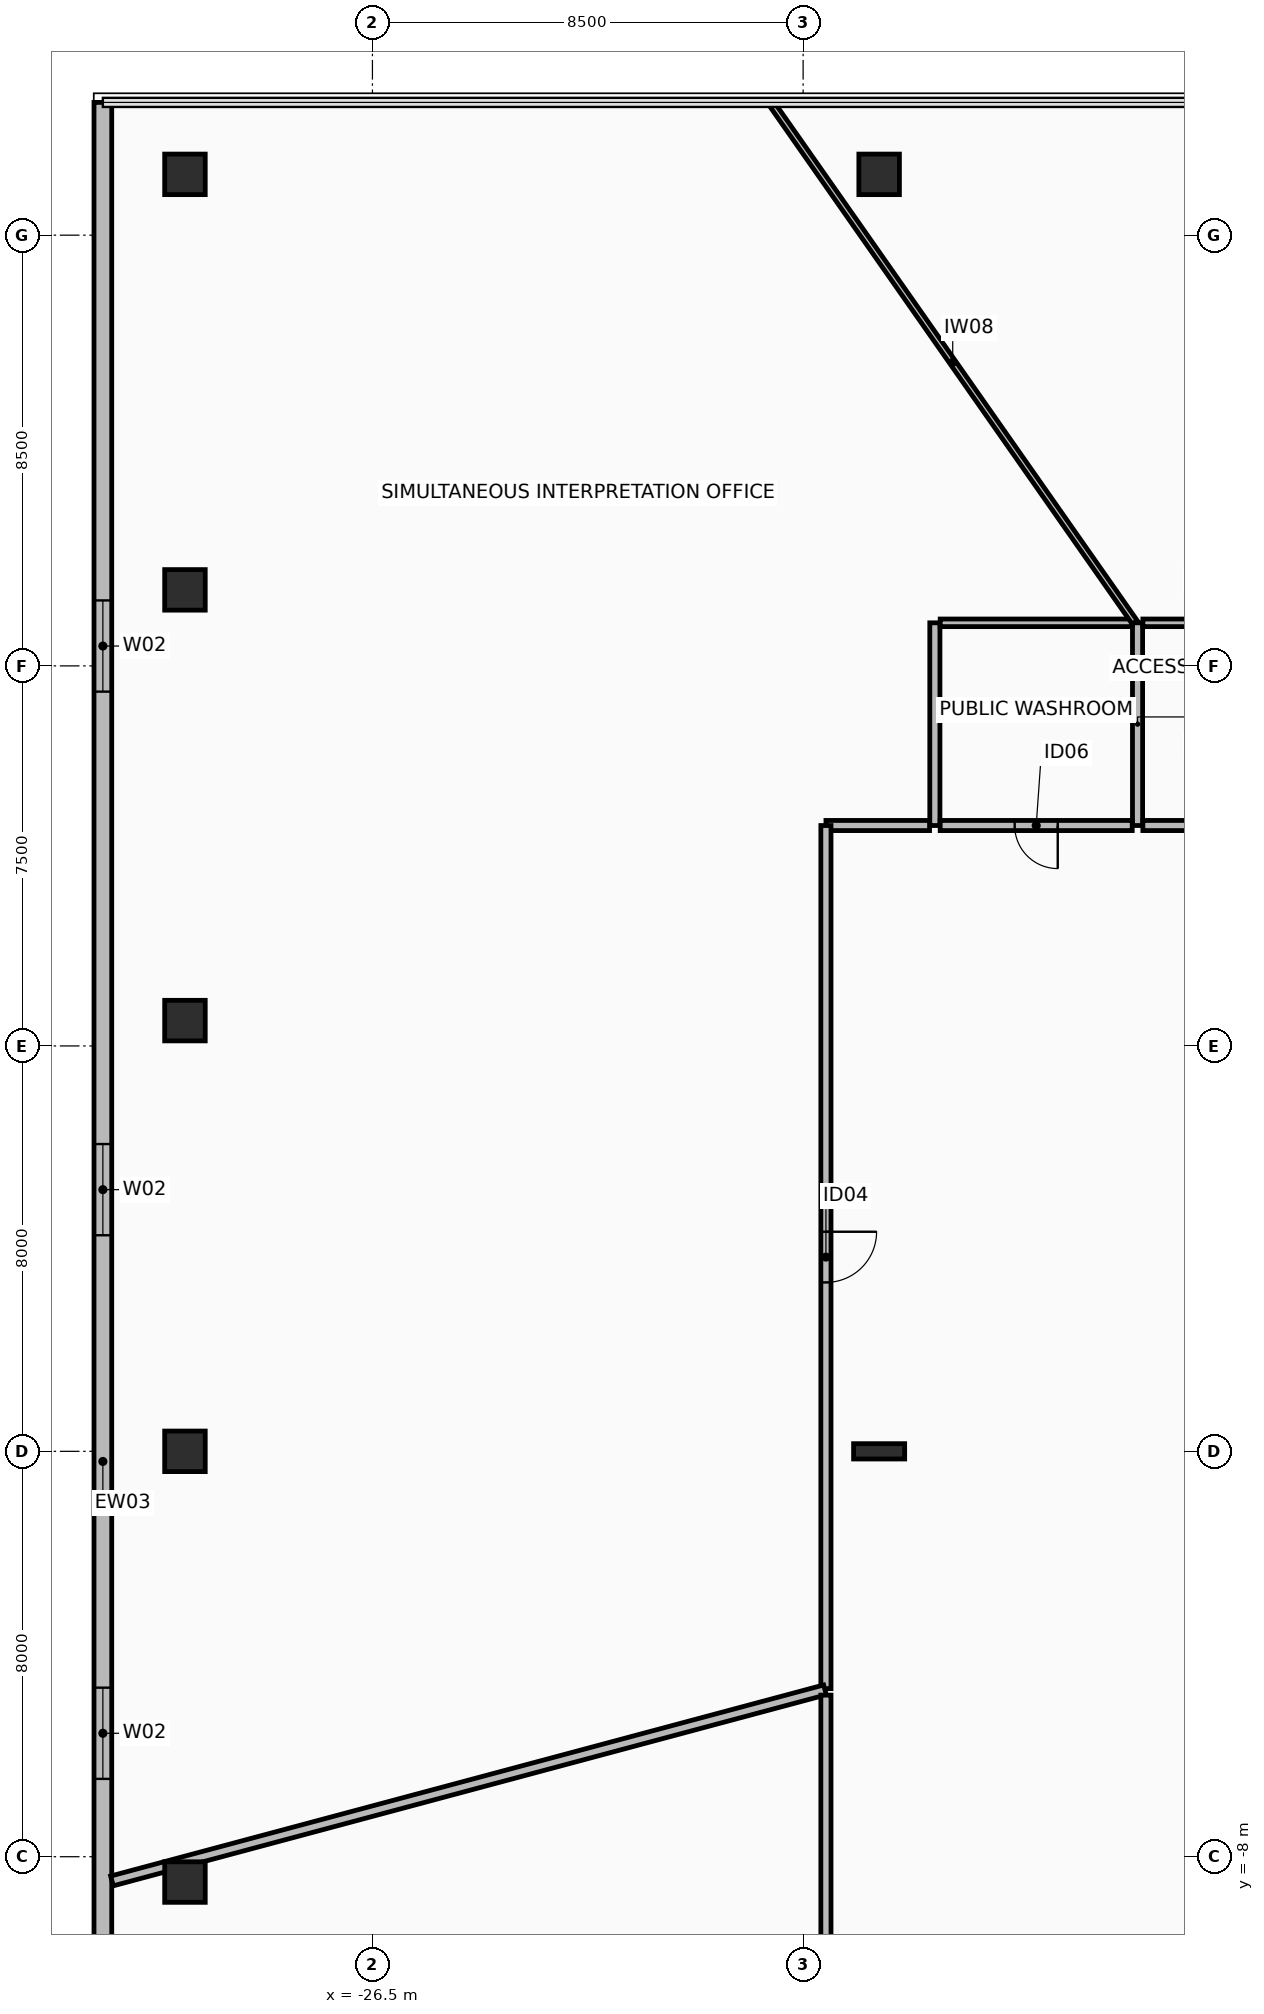
"""IFC4 building model, lengths in metres.
Left out: names, types, materials, properties, quantities, classifications, styles, units other than length and angle.
Written with IfcOpenShell. Run it as: python <this file> out.ifc"""

import sys

from ifc_helpers import new_model, si_unit, direction, frame, frame_2d, origin, origin_2d, place, context, subcontext, project, spatial, rectangle, hollow_rectangle, i_section, extrude, element, fill, save


model = new_model("IFC4")
c1 = context("Model", 3, precision=1e-05, world=origin(), true_north=direction((0.0, 1.0)))
c2 = subcontext(c1, "Body", "Model", "MODEL_VIEW")
j1 = project(units=[si_unit("LENGTHUNIT", "METRE"), si_unit("PLANEANGLEUNIT", "RADIAN")], contexts=[c1])
p1 = place(None, origin())
s1 = spatial("IfcSite", under=j1, at=p1, CompositionType="ELEMENT")
p2 = place(p1, origin())
s2 = spatial("IfcBuilding", under=s1, at=p2, CompositionType="ELEMENT")
p3 = place(p2, frame((0.0, 0.0, 26.5)))
s3 = spatial("IfcBuildingStorey", under=s2, at=p3, CompositionType="ELEMENT", Elevation=26.5)
for number, where, z_axis, x_axis in (
    (1, (-30.2, 25.2, 0.0), (0.0, 0.0, 1.0), (1.0, 0.0, 0.0)),
    (2, (-16.5, 25.2, 0.0), (0.0, 0.0, 1.0), (1.0, 0.0, 0.0)),
    (3, (-30.2, -8.5, 0.0), (0.0, 0.0, 1.0), (1.0, 0.0, 0.0)),
    (4, (-30.2, 0.0, 0.0), (0.0, 0.0, 1.0), (1.0, 0.0, 0.0)),
    (5, (-30.2, 8.5, 0.0), (0.0, 0.0, 1.0), (1.0, 0.0, 0.0)),
    (6, (-30.2, 17.0, 0.0), (0.0, 0.0, 1.0), (1.0, 0.0, 0.0)),
):
    element("IfcColumn", number, at=place(p3, frame(where, z_axis=z_axis, x_axis=x_axis)), inside=s3, PredefinedType="COLUMN", context=c2, shape_type="SweptSolid", body=[
        extrude(hollow_rectangle(XDim=0.8, YDim=0.8, WallThickness=0.045, at=origin_2d()), origin(), (0.0, 0.0, 1.0), 5.3),
    ])
p4 = place(p3, frame((-16.5, 0.0, 0.0), z_axis=(0.0, 0.0, 1.0), x_axis=(1.0, 0.0, 0.0)))
e7 = element("IfcColumn", 7, at=p4, inside=s3, PredefinedType="COLUMN", context=c2, shape_type="SweptSolid", body=[
    extrude(i_section(OverallWidth=0.302, OverallDepth=1.008, WebThickness=0.021, FlangeThickness=0.04, at=origin_2d()), origin(), (0.0, 0.0, 1.0), 5.3),
])
p5 = place(p3, frame((-31.82, 26.62, 0.0), z_axis=(0.0, 0.0, 1.0), x_axis=(0.0, -1.0, 0.0)))
e8 = element("IfcWall", 8, at=p5, inside=s3, PredefinedType="STANDARD", context=c2, shape_type="SweptSolid", body=[
    extrude(rectangle(XDim=53.64, YDim=0.35, at=frame_2d((26.82, 0.0))), origin(), (0.0, 0.0, 1.0), 5.105),
])
p6 = place(p5, frame((9.828, 0.0, 0.95)))
e9 = element("IfcOpeningElement", 9, at=p6, cuts=e8, PredefinedType="OPENING", context=c2, shape_type="SweptSolid", body=[
    extrude(rectangle(XDim=1.8, YDim=2.2, at=frame_2d((0.9, 1.1))), frame((0.0, 0.185, 0.0), z_axis=(0.0, -1.0, 0.0), x_axis=(1.0, 0.0, 0.0)), (0.0, 0.0, 1.0), 0.37),
])
p7 = place(p5, frame((20.556, 0.0, 0.95)))
e10 = element("IfcOpeningElement", 10, at=p7, cuts=e8, PredefinedType="OPENING", context=c2, shape_type="SweptSolid", body=[
    extrude(rectangle(XDim=1.8, YDim=2.2, at=frame_2d((0.9, 1.1))), frame((0.0, 0.185, 0.0), z_axis=(0.0, -1.0, 0.0), x_axis=(1.0, 0.0, 0.0)), (0.0, 0.0, 1.0), 0.37),
])
p8 = place(p5, frame((31.284, 0.0, 0.95)))
e11 = element("IfcOpeningElement", 11, at=p8, cuts=e8, PredefinedType="OPENING", context=c2, shape_type="SweptSolid", body=[
    extrude(rectangle(XDim=1.8, YDim=2.2, at=frame_2d((0.9, 1.1))), frame((0.0, 0.185, 0.0), z_axis=(0.0, -1.0, 0.0), x_axis=(1.0, 0.0, 0.0)), (0.0, 0.0, 1.0), 0.37),
])
p9 = place(p5, frame((42.012, 0.0, 0.95)))
e12 = element("IfcOpeningElement", 12, at=p9, cuts=e8, PredefinedType="OPENING", context=c2, shape_type="SweptSolid", body=[
    extrude(rectangle(XDim=1.8, YDim=2.2, at=frame_2d((0.9, 1.1))), frame((0.0, 0.185, 0.0), z_axis=(0.0, -1.0, 0.0), x_axis=(1.0, 0.0, 0.0)), (0.0, 0.0, 1.0), 0.37),
])
p10 = place(p3, frame((-11.4, 12.35, 0.0), z_axis=(0.0, 0.0, 1.0), x_axis=(0.0, 1.0, 0.0)))
e13 = element("IfcWall", 13, at=p10, inside=s3, PredefinedType="PARTITIONING", context=c2, shape_type="SweptSolid", body=[
    extrude(rectangle(XDim=4.0, YDim=0.2, at=frame_2d((2.0, 0.0))), origin(), (0.0, 0.0, 1.0), 2.9),
])
p11 = place(p3, frame((-11.295, 16.35, 0.0), z_axis=(0.0, 0.0, 1.0), x_axis=(1.0, 0.0, 0.0)))
e14 = element("IfcWall", 14, at=p11, inside=s3, PredefinedType="PARTITIONING", context=c2, shape_type="SweptSolid", body=[
    extrude(rectangle(XDim=2.695, YDim=0.15, at=frame_2d((1.347, 0.0))), origin(), (0.0, 0.0, 1.0), 2.9),
])
p12 = place(p3, frame((-8.705, 12.35, 0.0), z_axis=(0.0, 0.0, 1.0), x_axis=(-1.0, 0.0, 0.0)))
e15 = element("IfcWall", 15, at=p12, inside=s3, PredefinedType="PARTITIONING", context=c2, shape_type="SweptSolid", body=[
    extrude(rectangle(XDim=2.59, YDim=0.2, at=frame_2d((1.295, 0.0))), origin(), (0.0, 0.0, 1.0), 2.9),
])
p13 = place(p12, frame((0.87, 0.0, 0.0)))
e16 = element("IfcOpeningElement", 16, at=p13, cuts=e15, PredefinedType="OPENING", context=c2, shape_type="SweptSolid", body=[
    extrude(rectangle(XDim=0.85, YDim=2.1, at=frame_2d((0.425, 1.05))), frame((0.0, 0.11, 0.0), z_axis=(0.0, -1.0, 0.0), x_axis=(1.0, 0.0, 0.0)), (0.0, 0.0, 1.0), 0.22),
])
p14 = place(p3, frame((-15.4, 12.35, 0.0), z_axis=(0.0, 0.0, 1.0), x_axis=(0.0, 1.0, 0.0)))
e17 = element("IfcWall", 17, at=p14, inside=s3, PredefinedType="PARTITIONING", context=c2, shape_type="SweptSolid", body=[
    extrude(rectangle(XDim=4.0, YDim=0.2, at=frame_2d((2.0, 0.0))), origin(), (0.0, 0.0, 1.0), 3.3),
])
p15 = place(p3, frame((-15.295, 16.35, 0.0), z_axis=(0.0, 0.0, 1.0), x_axis=(1.0, 0.0, 0.0)))
e18 = element("IfcWall", 18, at=p15, inside=s3, PredefinedType="PARTITIONING", context=c2, shape_type="SweptSolid", body=[
    extrude(rectangle(XDim=3.79, YDim=0.15, at=frame_2d((1.895, 0.0))), origin(), (0.0, 0.0, 1.0), 5.105),
])
p16 = place(p3, frame((-11.505, 12.35, 0.0), z_axis=(0.0, 0.0, 1.0), x_axis=(-1.0, 0.0, 0.0)))
e19 = element("IfcWall", 19, at=p16, inside=s3, PredefinedType="PARTITIONING", context=c2, shape_type="SweptSolid", body=[
    extrude(rectangle(XDim=3.79, YDim=0.2, at=frame_2d((1.895, 0.0))), origin(), (0.0, 0.0, 1.0), 2.9),
])
p17 = place(p16, frame((1.47, 0.0, 0.0)))
e20 = element("IfcOpeningElement", 20, at=p17, cuts=e19, PredefinedType="OPENING", context=c2, shape_type="SweptSolid", body=[
    extrude(rectangle(XDim=0.85, YDim=2.1, at=frame_2d((0.425, 1.05))), frame((0.0, 0.11, 0.0), z_axis=(0.0, -1.0, 0.0), x_axis=(1.0, 0.0, 0.0)), (0.0, 0.0, 1.0), 0.22),
])
p18 = place(p3, frame((-11.456, 16.361, 0.0), z_axis=(0.0, 0.0, 1.0), x_axis=(-0.573565692607, 0.819159567035, 0.0)))
e21 = element("IfcWall", 21, at=p18, inside=s3, PredefinedType="PARTITIONING", context=c2, shape_type="SweptSolid", body=[
    extrude(rectangle(XDim=12.524, YDim=0.12, at=frame_2d((6.262, 0.0))), origin(), (0.0, 0.0, 1.0), 2.8),
])
p19 = place(p3, frame((-15.505, 12.35, 0.0), z_axis=(0.0, 0.0, 1.0), x_axis=(-1.0, 0.0, 0.0)))
e22 = element("IfcWall", 22, at=p19, inside=s3, PredefinedType="PARTITIONING", context=c2, shape_type="SweptSolid", body=[
    extrude(rectangle(XDim=2.044, YDim=0.2, at=frame_2d((1.022, 0.0))), origin(), (0.0, 0.0, 1.0), 3.3),
])
p20 = place(p3, frame((-17.55, 12.349, 0.0), z_axis=(0.0, 0.0, 1.0), x_axis=(0.0, -1.0, 0.0)))
e23 = element("IfcWall", 23, at=p20, inside=s3, PredefinedType="PARTITIONING", context=c2, shape_type="SweptSolid", body=[
    extrude(rectangle(XDim=17.033, YDim=0.2, at=frame_2d((8.516, 0.0))), origin(), (0.0, 0.0, 1.0), 3.3),
])
p21 = place(p20, frame((8.016, 0.0, 0.0)))
e24 = element("IfcOpeningElement", 24, at=p21, cuts=e23, PredefinedType="OPENING", context=c2, shape_type="SweptSolid", body=[
    extrude(rectangle(XDim=1.0, YDim=2.15, at=frame_2d((0.5, 1.075))), frame((0.0, 0.11, 0.0), z_axis=(0.0, -1.0, 0.0), x_axis=(1.0, 0.0, 0.0)), (0.0, 0.0, 1.0), 0.22),
])
p22 = place(p3, frame((-17.569, -4.708, 0.0), z_axis=(0.0, 0.0, 1.0), x_axis=(-0.965928003493, -0.258810919529, 0.0)))
e25 = element("IfcWall", 25, at=p22, inside=s3, PredefinedType="PARTITIONING", context=c2, shape_type="SweptSolid", body=[
    extrude(rectangle(XDim=14.568, YDim=0.2, at=frame_2d((7.284, 0.0))), origin(), (0.0, 0.0, 1.0), 2.8),
])
p23 = place(p3, frame((-17.55, -4.811, 0.0), z_axis=(0.0, 0.0, 1.0), x_axis=(0.0, -1.0, 0.0)))
e26 = element("IfcWall", 26, at=p23, inside=s3, PredefinedType="PARTITIONING", context=c2, shape_type="SweptSolid", body=[
    extrude(rectangle(XDim=7.364, YDim=0.2, at=frame_2d((3.682, 0.0))), origin(), (0.0, 0.0, 1.0), 2.9),
])
p24 = place(p6, origin())
e27 = element("IfcWindow", 27, at=p24, inside=s3, PartitioningType="SINGLE_PANEL", PredefinedType="WINDOW", context=c2, shape_type="SweptSolid", body=[
    extrude(rectangle(XDim=1.8, YDim=2.2, at=frame_2d((0.9, 1.1))), frame((0.0, 0.03, 0.0), z_axis=(0.0, -1.0, 0.0), x_axis=(1.0, 0.0, 0.0)), (0.0, 0.0, 1.0), 0.06),
])
fill(e9, e27)
p25 = place(p7, origin())
e28 = element("IfcWindow", 28, at=p25, inside=s3, PartitioningType="SINGLE_PANEL", PredefinedType="WINDOW", context=c2, shape_type="SweptSolid", body=[
    extrude(rectangle(XDim=1.8, YDim=2.2, at=frame_2d((0.9, 1.1))), frame((0.0, 0.03, 0.0), z_axis=(0.0, -1.0, 0.0), x_axis=(1.0, 0.0, 0.0)), (0.0, 0.0, 1.0), 0.06),
])
fill(e10, e28)
p26 = place(p8, origin())
e29 = element("IfcWindow", 29, at=p26, inside=s3, PartitioningType="SINGLE_PANEL", PredefinedType="WINDOW", context=c2, shape_type="SweptSolid", body=[
    extrude(rectangle(XDim=1.8, YDim=2.2, at=frame_2d((0.9, 1.1))), frame((0.0, 0.03, 0.0), z_axis=(0.0, -1.0, 0.0), x_axis=(1.0, 0.0, 0.0)), (0.0, 0.0, 1.0), 0.06),
])
fill(e11, e29)
p27 = place(p17, origin())
e30 = element("IfcDoor", 30, at=p27, inside=s3, OperationType="SINGLE_SWING_RIGHT", PredefinedType="DOOR", context=c2, shape_type="SweptSolid", body=[
    extrude(rectangle(XDim=0.85, YDim=2.1, at=frame_2d((0.425, 1.05))), frame((0.0, 0.025, 0.0), z_axis=(0.0, -1.0, 0.0), x_axis=(1.0, 0.0, 0.0)), (0.0, 0.0, 1.0), 0.05),
])
fill(e20, e30)
p28 = place(p21, origin())
e31 = element("IfcDoor", 31, at=p28, inside=s3, OperationType="SINGLE_SWING_RIGHT", PredefinedType="DOOR", context=c2, shape_type="SweptSolid", body=[
    extrude(rectangle(XDim=1.0, YDim=2.15, at=frame_2d((0.5, 1.075))), frame((0.0, 0.025, 0.0), z_axis=(0.0, -1.0, 0.0), x_axis=(1.0, 0.0, 0.0)), (0.0, 0.0, 1.0), 0.05),
])
fill(e24, e31)
save(model, sys.argv[1])
